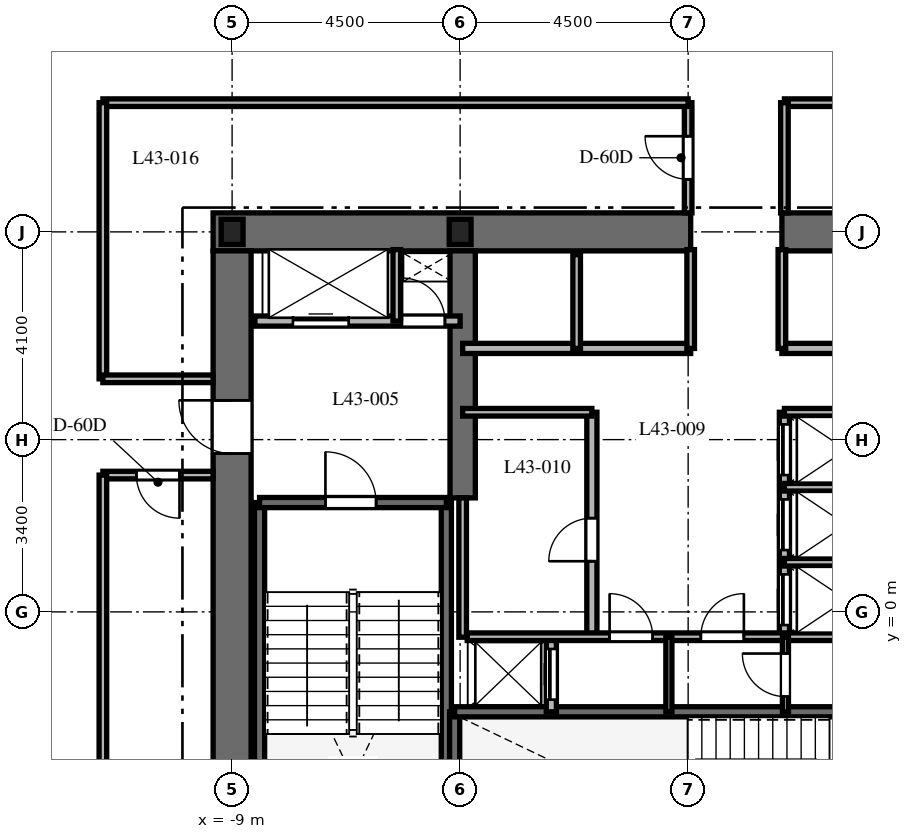
"""IFC4 building model, lengths in metres.
Left out: names, types, materials, properties, quantities, classifications, styles, units other than length and angle.
Written with IfcOpenShell. Run it as: python <this file> out.ifc"""

import sys

from ifc_helpers import new_model, si_unit, direction, frame, frame_2d, origin, origin_2d, place, context, subcontext, project, spatial, rectangle, i_section, extrude, element, fill, save


model = new_model("IFC4")
c1 = context("Model", 3, precision=1e-05, world=origin(), true_north=direction((0.0, 1.0)))
c2 = subcontext(c1, "Body", "Model", "MODEL_VIEW")
j1 = project(units=[si_unit("LENGTHUNIT", "METRE"), si_unit("PLANEANGLEUNIT", "RADIAN")], contexts=[c1])
p1 = place(None, origin())
s1 = spatial("IfcSite", under=j1, at=p1, CompositionType="ELEMENT")
p2 = place(p1, origin())
s2 = spatial("IfcBuilding", under=s1, at=p2, CompositionType="ELEMENT")
p3 = place(p2, frame((0.0, 0.0, 175.6)))
s3 = spatial("IfcBuildingStorey", under=s2, at=p3, CompositionType="ELEMENT", Elevation=175.6)
p4 = place(p3, frame((-9.375, 7.5, 0.0), z_axis=(0.0, 0.0, 1.0), x_axis=(1.0, 0.0, 0.0)))
e1 = element("IfcWall", 1, at=p4, inside=s3, PredefinedType="SHEAR", context=c2, shape_type="SweptSolid", body=[
    extrude(rectangle(XDim=9.425, YDim=0.75, at=frame_2d((4.712, 0.0))), origin(), (0.0, 0.0, 1.0), 3.7),
])
p5 = place(p3, frame((1.85, 7.5, 0.0), z_axis=(0.0, 0.0, 1.0), x_axis=(1.0, 0.0, 0.0)))
e2 = element("IfcWall", 2, at=p5, inside=s3, PredefinedType="SHEAR", context=c2, shape_type="SweptSolid", body=[
    extrude(rectangle(XDim=7.525, YDim=0.75, at=frame_2d((3.762, 0.0))), origin(), (0.0, 0.0, 1.0), 3.7),
])
p6 = place(p3, frame((-9.0, -7.125, 0.0), z_axis=(0.0, 0.0, 1.0), x_axis=(0.0, 1.0, 0.0)))
e3 = element("IfcWall", 3, at=p6, inside=s3, PredefinedType="SHEAR", context=c2, shape_type="SweptSolid", body=[
    extrude(rectangle(XDim=14.25, YDim=0.75, at=frame_2d((7.125, 0.0))), origin(), (0.0, 0.0, 1.0), 3.7),
])
p7 = place(p6, frame((10.25, 0.0, 0.0)))
e4 = element("IfcOpeningElement", 4, at=p7, cuts=e3, PredefinedType="OPENING", context=c2, shape_type="SweptSolid", body=[
    extrude(rectangle(XDim=1.05, YDim=2.15, at=frame_2d((0.525, 1.075))), frame((0.0, 0.385, 0.0), z_axis=(0.0, -1.0, 0.0), x_axis=(1.0, 0.0, 0.0)), (0.0, 0.0, 1.0), 0.77),
])
p8 = place(p3, frame((-4.45, 2.25, 0.0), z_axis=(0.0, 0.0, 1.0), x_axis=(0.0, 1.0, 0.0)))
e5 = element("IfcWall", 5, at=p8, inside=s3, PredefinedType="SHEAR", context=c2, shape_type="SweptSolid", body=[
    extrude(rectangle(XDim=4.875, YDim=0.5, at=frame_2d((2.438, 0.0))), origin(), (0.0, 0.0, 1.0), 3.7),
])
for number, where, z_axis, x_axis in (
    (6, (-8.458, -6.985, 0.0), (0.0, 0.0, 1.0), (0.0, 1.0, 0.0)),
    (7, (-4.772, -6.985, 0.0), (0.0, 0.0, 1.0), (0.0, 1.0, 0.0)),
):
    element("IfcWall", number, at=place(p3, frame(where, z_axis=z_axis, x_axis=x_axis)), inside=s3, PredefinedType="SHEAR", context=c2, shape_type="SweptSolid", body=[
        extrude(rectangle(XDim=9.143, YDim=0.2, at=frame_2d((4.572, 0.0))), origin(), (0.0, 0.0, 1.0), 3.7),
    ])
p9 = place(p3, frame((-8.458, 2.158, 0.0), z_axis=(0.0, 0.0, 1.0), x_axis=(1.0, 0.0, 0.0)))
e8 = element("IfcWall", 8, at=p9, inside=s3, PredefinedType="SHEAR", context=c2, shape_type="SweptSolid", body=[
    extrude(rectangle(XDim=3.686, YDim=0.2, at=frame_2d((1.843, 0.0))), origin(), (0.0, 0.0, 1.0), 3.7),
])
p10 = place(p9, frame((1.3, 0.0, 0.0)))
e9 = element("IfcOpeningElement", 9, at=p10, cuts=e8, PredefinedType="OPENING", context=c2, shape_type="SweptSolid", body=[
    extrude(rectangle(XDim=1.0, YDim=2.15, at=frame_2d((0.5, 1.075))), frame((0.0, 0.11, 0.0), z_axis=(0.0, -1.0, 0.0), x_axis=(1.0, 0.0, 0.0)), (0.0, 0.0, 1.0), 0.22),
])
p11 = place(p3, frame((-4.608, -5.658, 0.0), z_axis=(0.0, 0.0, 1.0), x_axis=(0.0, 1.0, 0.0)))
e10 = element("IfcWall", 10, at=p11, inside=s3, PredefinedType="SHEAR", context=c2, shape_type="SweptSolid", body=[
    extrude(rectangle(XDim=3.686, YDim=0.2, at=frame_2d((1.843, 0.0))), origin(), (0.0, 0.0, 1.0), 3.7),
])
p12 = place(p3, frame((-4.608, -1.972, 0.0), z_axis=(0.0, 0.0, 1.0), x_axis=(1.0, 0.0, 0.0)))
e11 = element("IfcWall", 11, at=p12, inside=s3, PredefinedType="SHEAR", context=c2, shape_type="SweptSolid", body=[
    extrude(rectangle(XDim=9.166, YDim=0.2, at=frame_2d((4.583, 0.0))), origin(), (0.0, 0.0, 1.0), 3.7),
])
for number, where, z_axis, x_axis in (
    (12, (-4.5, 7.5, 0.0), (0.0, 0.0, 1.0), (1.0, 0.0, 0.0)),
    (13, (-9.0, 7.5, 0.0), (0.0, 0.0, 1.0), (1.0, 0.0, 0.0)),
):
    element("IfcColumn", number, at=place(p3, frame(where, z_axis=z_axis, x_axis=x_axis)), inside=s3, PredefinedType="COLUMN", context=c2, shape_type="SweptSolid", body=[
        extrude(i_section(OverallWidth=0.432, OverallDepth=0.498, WebThickness=0.056, FlangeThickness=0.089, at=origin_2d()), origin(), (0.0, 0.0, 1.0), 3.7),
    ])
p13 = place(p3, frame((-8.55, 5.74, 0.0), z_axis=(0.0, 0.0, 1.0), x_axis=(1.0, 0.0, 0.0)))
e14 = element("IfcWall", 14, at=p13, inside=s3, PredefinedType="PARTITIONING", context=c2, shape_type="SweptSolid", body=[
    extrude(rectangle(XDim=4.05, YDim=0.2, at=frame_2d((2.025, 0.0))), origin(), (0.0, 0.0, 1.0), 3.4),
])
p14 = place(p13, frame((0.75, 0.0, 0.0)))
e15 = element("IfcOpeningElement", 15, at=p14, cuts=e14, PredefinedType="OPENING", context=c2, shape_type="SweptSolid", body=[
    extrude(rectangle(XDim=1.1, YDim=2.2, at=frame_2d((0.55, 1.1))), frame((0.0, 0.11, 0.0), z_axis=(0.0, -1.0, 0.0), x_axis=(1.0, 0.0, 0.0)), (0.0, 0.0, 1.0), 0.22),
])
p15 = place(p13, frame((2.9, 0.0, 0.0)))
e16 = element("IfcOpeningElement", 16, at=p15, cuts=e14, PredefinedType="OPENING", context=c2, shape_type="SweptSolid", body=[
    extrude(rectangle(XDim=0.85, YDim=2.03, at=frame_2d((0.425, 1.015))), frame((0.0, 0.11, 0.0), z_axis=(0.0, -1.0, 0.0), x_axis=(1.0, 0.0, 0.0)), (0.0, 0.0, 1.0), 0.22),
])
p16 = place(p3, frame((-5.75, 5.74, 0.0), z_axis=(0.0, 0.0, 1.0), x_axis=(0.0, 1.0, 0.0)))
e17 = element("IfcWall", 17, at=p16, inside=s3, PredefinedType="PARTITIONING", context=c2, shape_type="SweptSolid", body=[
    extrude(rectangle(XDim=1.41, YDim=0.15, at=frame_2d((0.705, 0.0))), origin(), (0.0, 0.0, 1.0), 3.4),
])
p17 = place(p3, frame((-2.7, -1.972, 0.0), z_axis=(0.0, 0.0, 1.0), x_axis=(0.0, 1.0, 0.0)))
e18 = element("IfcWall", 18, at=p17, inside=s3, PredefinedType="PARTITIONING", context=c2, shape_type="SweptSolid", body=[
    extrude(rectangle(XDim=1.472, YDim=0.2, at=frame_2d((0.736, 0.0))), origin(), (0.0, 0.0, 1.0), 3.4),
])
p18 = place(p17, frame((0.24, 0.0, 0.0)))
e19 = element("IfcOpeningElement", 19, at=p18, cuts=e18, PredefinedType="OPENING", context=c2, shape_type="SweptSolid", body=[
    extrude(rectangle(XDim=1.0, YDim=2.2, at=frame_2d((0.5, 1.1))), frame((0.0, 0.11, 0.0), z_axis=(0.0, -1.0, 0.0), x_axis=(1.0, 0.0, 0.0)), (0.0, 0.0, 1.0), 0.22),
])
p19 = place(p3, frame((-4.45, 5.2, 0.0), z_axis=(0.0, 0.0, 1.0), x_axis=(1.0, 0.0, 0.0)))
e20 = element("IfcWall", 20, at=p19, inside=s3, PredefinedType="PARTITIONING", context=c2, shape_type="SweptSolid", body=[
    extrude(rectangle(XDim=4.5, YDim=0.2, at=frame_2d((2.25, 0.0))), origin(), (0.0, 0.0, 1.0), 3.4),
])
p20 = place(p3, frame((1.85, 5.2, 0.0), z_axis=(0.0, 0.0, 1.0), x_axis=(1.0, 0.0, 0.0)))
e21 = element("IfcWall", 21, at=p20, inside=s3, PredefinedType="PARTITIONING", context=c2, shape_type="SweptSolid", body=[
    extrude(rectangle(XDim=2.6, YDim=0.2, at=frame_2d((1.3, 0.0))), origin(), (0.0, 0.0, 1.0), 3.4),
])
p21 = place(p3, frame((-2.2, 5.2, 0.0), z_axis=(0.0, 0.0, 1.0), x_axis=(0.0, 1.0, 0.0)))
e22 = element("IfcWall", 22, at=p21, inside=s3, PredefinedType="PARTITIONING", context=c2, shape_type="SweptSolid", body=[
    extrude(rectangle(XDim=1.85, YDim=0.15, at=frame_2d((0.925, 0.0))), origin(), (0.0, 0.0, 1.0), 3.4),
])
for number, where, z_axis, x_axis in (
    (23, (0.05, 5.2, 0.0), (0.0, 0.0, 1.0), (0.0, 1.0, 0.0)),
    (24, (1.85, 5.2, 0.0), (0.0, 0.0, 1.0), (0.0, 1.0, 0.0)),
):
    element("IfcWall", number, at=place(p3, frame(where, z_axis=z_axis, x_axis=x_axis)), inside=s3, PredefinedType="PARTITIONING", context=c2, shape_type="SweptSolid", body=[
        extrude(rectangle(XDim=1.95, YDim=0.15, at=frame_2d((0.975, 0.0))), origin(), (0.0, 0.0, 1.0), 3.4),
    ])
p22 = place(p3, frame((-4.45, -0.5, 0.0), z_axis=(0.0, 0.0, 1.0), x_axis=(0.0, 1.0, 0.0)))
e25 = element("IfcWall", 25, at=p22, inside=s3, PredefinedType="PARTITIONING", context=c2, shape_type="SweptSolid", body=[
    extrude(rectangle(XDim=2.75, YDim=0.15, at=frame_2d((1.375, 0.0))), origin(), (0.0, 0.0, 1.0), 3.4),
])
p23 = place(p3, frame((-1.9, -0.5, 0.0), z_axis=(0.0, 0.0, 1.0), x_axis=(0.0, 1.0, 0.0)))
e26 = element("IfcWall", 26, at=p23, inside=s3, PredefinedType="PARTITIONING", context=c2, shape_type="SweptSolid", body=[
    extrude(rectangle(XDim=4.44, YDim=0.2, at=frame_2d((2.22, 0.0))), origin(), (0.0, 0.0, 1.0), 3.4),
])
p24 = place(p23, frame((1.5, 0.0, 0.0)))
e27 = element("IfcOpeningElement", 27, at=p24, cuts=e26, PredefinedType="OPENING", context=c2, shape_type="SweptSolid", body=[
    extrude(rectangle(XDim=0.85, YDim=2.03, at=frame_2d((0.425, 1.015))), frame((0.0, 0.11, 0.0), z_axis=(0.0, -1.0, 0.0), x_axis=(1.0, 0.0, 0.0)), (0.0, 0.0, 1.0), 0.22),
])
p25 = place(p3, frame((-4.45, 3.94, 0.0), z_axis=(0.0, 0.0, 1.0), x_axis=(1.0, 0.0, 0.0)))
e28 = element("IfcWall", 28, at=p25, inside=s3, PredefinedType="PARTITIONING", context=c2, shape_type="SweptSolid", body=[
    extrude(rectangle(XDim=2.55, YDim=0.15, at=frame_2d((1.275, 0.0))), origin(), (0.0, 0.0, 1.0), 3.4),
])
p26 = place(p3, frame((1.9, -0.5, 0.0), z_axis=(0.0, 0.0, 1.0), x_axis=(0.0, 1.0, 0.0)))
e29 = element("IfcWall", 29, at=p26, inside=s3, PredefinedType="PARTITIONING", context=c2, shape_type="SweptSolid", body=[
    extrude(rectangle(XDim=4.44, YDim=0.2, at=frame_2d((2.22, 0.0))), origin(), (0.0, 0.0, 1.0), 3.4),
])
p27 = place(p26, frame((0.24, 0.0, 0.0)))
e30 = element("IfcOpeningElement", 30, at=p27, cuts=e29, PredefinedType="OPENING", context=c2, shape_type="SweptSolid", body=[
    extrude(rectangle(XDim=1.0, YDim=2.2, at=frame_2d((0.5, 1.1))), frame((0.0, 0.11, 0.0), z_axis=(0.0, -1.0, 0.0), x_axis=(1.0, 0.0, 0.0)), (0.0, 0.0, 1.0), 0.22),
])
p28 = place(p26, frame((1.72, 0.0, 0.0)))
e31 = element("IfcOpeningElement", 31, at=p28, cuts=e29, PredefinedType="OPENING", context=c2, shape_type="SweptSolid", body=[
    extrude(rectangle(XDim=1.0, YDim=2.2, at=frame_2d((0.5, 1.1))), frame((0.0, 0.11, 0.0), z_axis=(0.0, -1.0, 0.0), x_axis=(1.0, 0.0, 0.0)), (0.0, 0.0, 1.0), 0.22),
])
p29 = place(p26, frame((3.2, 0.0, 0.0)))
e32 = element("IfcOpeningElement", 32, at=p29, cuts=e29, PredefinedType="OPENING", context=c2, shape_type="SweptSolid", body=[
    extrude(rectangle(XDim=1.0, YDim=2.2, at=frame_2d((0.5, 1.1))), frame((0.0, 0.11, 0.0), z_axis=(0.0, -1.0, 0.0), x_axis=(1.0, 0.0, 0.0)), (0.0, 0.0, 1.0), 0.22),
])
for number, where, z_axis, x_axis in (
    (33, (1.9, 3.94, 0.0), (0.0, 0.0, 1.0), (1.0, 0.0, 0.0)),
    (34, (1.9, 0.98, 0.0), (0.0, 0.0, 1.0), (1.0, 0.0, 0.0)),
    (35, (1.9, 2.46, 0.0), (0.0, 0.0, 1.0), (1.0, 0.0, 0.0)),
):
    element("IfcWall", number, at=place(p3, frame(where, z_axis=z_axis, x_axis=x_axis)), inside=s3, PredefinedType="PARTITIONING", context=c2, shape_type="SweptSolid", body=[
        extrude(rectangle(XDim=2.55, YDim=0.15, at=frame_2d((1.275, 0.0))), origin(), (0.0, 0.0, 1.0), 3.4),
    ])
p30 = place(p3, frame((-4.36, -0.49, 0.0), z_axis=(0.0, 0.0, 1.0), x_axis=(1.0, 0.0, 0.0)))
e36 = element("IfcWall", 36, at=p30, inside=s3, PredefinedType="PARTITIONING", context=c2, shape_type="SweptSolid", body=[
    extrude(rectangle(XDim=8.72, YDim=0.15, at=frame_2d((4.36, 0.0))), origin(), (0.0, 0.0, 1.0), 3.4),
])
p31 = place(p30, frame((2.81, 0.0, 0.0)))
e37 = element("IfcOpeningElement", 37, at=p31, cuts=e36, PredefinedType="OPENING", context=c2, shape_type="SweptSolid", body=[
    extrude(rectangle(XDim=0.85, YDim=2.03, at=frame_2d((0.425, 1.015))), frame((0.0, 0.085, 0.0), z_axis=(0.0, -1.0, 0.0), x_axis=(1.0, 0.0, 0.0)), (0.0, 0.0, 1.0), 0.17),
])
p32 = place(p30, frame((4.61, 0.0, 0.0)))
e38 = element("IfcOpeningElement", 38, at=p32, cuts=e36, PredefinedType="OPENING", context=c2, shape_type="SweptSolid", body=[
    extrude(rectangle(XDim=0.85, YDim=2.03, at=frame_2d((0.425, 1.015))), frame((0.0, 0.085, 0.0), z_axis=(0.0, -1.0, 0.0), x_axis=(1.0, 0.0, 0.0)), (0.0, 0.0, 1.0), 0.17),
])
p33 = place(p3, frame((-0.38, -1.972, 0.0), z_axis=(0.0, 0.0, 1.0), x_axis=(0.0, 1.0, 0.0)))
e39 = element("IfcWall", 39, at=p33, inside=s3, PredefinedType="PARTITIONING", context=c2, shape_type="SweptSolid", body=[
    extrude(rectangle(XDim=1.472, YDim=0.12, at=frame_2d((0.736, 0.0))), origin(), (0.0, 0.0, 1.0), 3.4),
])
p34 = place(p3, frame((1.92, -1.972, 0.0), z_axis=(0.0, 0.0, 1.0), x_axis=(0.0, 1.0, 0.0)))
e40 = element("IfcWall", 40, at=p34, inside=s3, PredefinedType="PARTITIONING", context=c2, shape_type="SweptSolid", body=[
    extrude(rectangle(XDim=1.472, YDim=0.12, at=frame_2d((0.736, 0.0))), origin(), (0.0, 0.0, 1.0), 3.4),
])
p35 = place(p34, frame((0.3, 0.0, 0.0)))
e41 = element("IfcOpeningElement", 41, at=p35, cuts=e40, PredefinedType="OPENING", context=c2, shape_type="SweptSolid", body=[
    extrude(rectangle(XDim=0.85, YDim=2.03, at=frame_2d((0.425, 1.015))), frame((0.0, 0.07, 0.0), z_axis=(0.0, -1.0, 0.0), x_axis=(1.0, 0.0, 0.0)), (0.0, 0.0, 1.0), 0.14),
])
p36 = place(p3, frame((11.55, 10.05, 0.0), z_axis=(0.0, 0.0, 1.0), x_axis=(-1.0, 0.0, 0.0)))
e42 = element("IfcWall", 42, at=p36, inside=s3, PredefinedType="PARTITIONING", context=c2, shape_type="SweptSolid", body=[
    extrude(rectangle(XDim=9.65, YDim=0.15, at=frame_2d((4.825, 0.0))), origin(), (0.0, 0.0, 1.0), 2.84),
])
p37 = place(p3, frame((1.9, 10.05, 0.0), z_axis=(0.0, 0.0, 1.0), x_axis=(0.0, -1.0, 0.0)))
e43 = element("IfcWall", 43, at=p37, inside=s3, PredefinedType="PARTITIONING", context=c2, shape_type="SweptSolid", body=[
    extrude(rectangle(XDim=2.175, YDim=0.15, at=frame_2d((1.087, 0.0))), origin(), (0.0, 0.0, 1.0), 3.4),
])
p38 = place(p3, frame((0.0, 7.875, 0.0), z_axis=(0.0, 0.0, 1.0), x_axis=(0.0, 1.0, 0.0)))
e44 = element("IfcWall", 44, at=p38, inside=s3, PredefinedType="PARTITIONING", context=c2, shape_type="SweptSolid", body=[
    extrude(rectangle(XDim=2.175, YDim=0.15, at=frame_2d((1.087, 0.0))), origin(), (0.0, 0.0, 1.0), 3.4),
])
p39 = place(p38, frame((0.663, 0.0, 0.0)))
e45 = element("IfcOpeningElement", 45, at=p39, cuts=e44, PredefinedType="OPENING", context=c2, shape_type="SweptSolid", body=[
    extrude(rectangle(XDim=0.85, YDim=2.03, at=frame_2d((0.425, 1.015))), frame((0.0, 0.085, 0.0), z_axis=(0.0, -1.0, 0.0), x_axis=(1.0, 0.0, 0.0)), (0.0, 0.0, 1.0), 0.17),
])
p40 = place(p3, frame((0.0, 10.05, 0.0), z_axis=(0.0, 0.0, 1.0), x_axis=(-1.0, 0.0, 0.0)))
e46 = element("IfcWall", 46, at=p40, inside=s3, PredefinedType="PARTITIONING", context=c2, shape_type="SweptSolid", body=[
    extrude(rectangle(XDim=11.55, YDim=0.15, at=frame_2d((5.775, 0.0))), origin(), (0.0, 0.0, 1.0), 2.84),
])
p41 = place(p3, frame((-11.55, 10.05, 0.0), z_axis=(0.0, 0.0, 1.0), x_axis=(0.0, -1.0, 0.0)))
e47 = element("IfcWall", 47, at=p41, inside=s3, PredefinedType="PARTITIONING", context=c2, shape_type="SweptSolid", body=[
    extrude(rectangle(XDim=5.45, YDim=0.15, at=frame_2d((2.725, 0.0))), origin(), (0.0, 0.0, 1.0), 2.84),
])
p42 = place(p3, frame((-11.55, 4.6, 0.0), z_axis=(0.0, 0.0, 1.0), x_axis=(1.0, 0.0, 0.0)))
e48 = element("IfcWall", 48, at=p42, inside=s3, PredefinedType="PARTITIONING", context=c2, shape_type="SweptSolid", body=[
    extrude(rectangle(XDim=2.175, YDim=0.15, at=frame_2d((1.087, 0.0))), origin(), (0.0, 0.0, 1.0), 3.4),
])
p43 = place(p3, frame((-9.375, 2.7, 0.0), z_axis=(0.0, 0.0, 1.0), x_axis=(-1.0, 0.0, 0.0)))
e49 = element("IfcWall", 49, at=p43, inside=s3, PredefinedType="PARTITIONING", context=c2, shape_type="SweptSolid", body=[
    extrude(rectangle(XDim=2.175, YDim=0.15, at=frame_2d((1.087, 0.0))), origin(), (0.0, 0.0, 1.0), 3.4),
])
p44 = place(p43, frame((0.663, 0.0, 0.0)))
e50 = element("IfcOpeningElement", 50, at=p44, cuts=e49, PredefinedType="OPENING", context=c2, shape_type="SweptSolid", body=[
    extrude(rectangle(XDim=0.85, YDim=2.03, at=frame_2d((0.425, 1.015))), frame((0.0, 0.085, 0.0), z_axis=(0.0, -1.0, 0.0), x_axis=(1.0, 0.0, 0.0)), (0.0, 0.0, 1.0), 0.17),
])
p45 = place(p3, frame((-11.55, 2.7, 0.0), z_axis=(0.0, 0.0, 1.0), x_axis=(0.0, -1.0, 0.0)))
e51 = element("IfcWall", 51, at=p45, inside=s3, PredefinedType="PARTITIONING", context=c2, shape_type="SweptSolid", body=[
    extrude(rectangle(XDim=12.75, YDim=0.15, at=frame_2d((6.375, 0.0))), origin(), (0.0, 0.0, 1.0), 2.84),
])
p46 = place(p10, origin())
e52 = element("IfcDoor", 52, at=p46, inside=s3, OperationType="SINGLE_SWING_LEFT", PredefinedType="DOOR", context=c2, shape_type="SweptSolid", body=[
    extrude(rectangle(XDim=1.0, YDim=2.15, at=frame_2d((0.5, 1.075))), frame((0.0, 0.025, 0.0), z_axis=(0.0, -1.0, 0.0), x_axis=(1.0, 0.0, 0.0)), (0.0, 0.0, 1.0), 0.05),
])
fill(e9, e52)
p47 = place(p7, origin())
e53 = element("IfcDoor", 53, at=p47, inside=s3, OperationType="SINGLE_SWING_RIGHT", PredefinedType="DOOR", context=c2, shape_type="SweptSolid", body=[
    extrude(rectangle(XDim=1.05, YDim=2.15, at=frame_2d((0.525, 1.075))), frame((0.0, 0.025, 0.0), z_axis=(0.0, -1.0, 0.0), x_axis=(1.0, 0.0, 0.0)), (0.0, 0.0, 1.0), 0.05),
])
fill(e4, e53)
p48 = place(p14, origin())
e54 = element("IfcDoor", 54, at=p48, inside=s3, OperationType="SLIDING_TO_LEFT", PredefinedType="DOOR", context=c2, shape_type="SweptSolid", body=[
    extrude(rectangle(XDim=1.1, YDim=2.2, at=frame_2d((0.55, 1.1))), frame((0.0, 0.025, 0.0), z_axis=(0.0, -1.0, 0.0), x_axis=(1.0, 0.0, 0.0)), (0.0, 0.0, 1.0), 0.05),
])
fill(e15, e54)
p49 = place(p15, origin())
e55 = element("IfcDoor", 55, at=p49, inside=s3, OperationType="SINGLE_SWING_LEFT", PredefinedType="DOOR", context=c2, shape_type="SweptSolid", body=[
    extrude(rectangle(XDim=0.85, YDim=2.03, at=frame_2d((0.425, 1.015))), frame((0.0, 0.025, 0.0), z_axis=(0.0, -1.0, 0.0), x_axis=(1.0, 0.0, 0.0)), (0.0, 0.0, 1.0), 0.05),
])
fill(e16, e55)
p50 = place(p18, origin())
e56 = element("IfcDoor", 56, at=p50, inside=s3, OperationType="SLIDING_TO_LEFT", PredefinedType="DOOR", context=c2, shape_type="SweptSolid", body=[
    extrude(rectangle(XDim=1.0, YDim=2.2, at=frame_2d((0.5, 1.1))), frame((0.0, 0.025, 0.0), z_axis=(0.0, -1.0, 0.0), x_axis=(1.0, 0.0, 0.0)), (0.0, 0.0, 1.0), 0.05),
])
fill(e19, e56)
p51 = place(p24, origin())
e57 = element("IfcDoor", 57, at=p51, inside=s3, OperationType="SINGLE_SWING_LEFT", PredefinedType="DOOR", context=c2, shape_type="SweptSolid", body=[
    extrude(rectangle(XDim=0.85, YDim=2.03, at=frame_2d((0.425, 1.015))), frame((0.0, 0.025, 0.0), z_axis=(0.0, -1.0, 0.0), x_axis=(1.0, 0.0, 0.0)), (0.0, 0.0, 1.0), 0.05),
])
fill(e27, e57)
p52 = place(p27, origin())
e58 = element("IfcDoor", 58, at=p52, inside=s3, OperationType="SLIDING_TO_RIGHT", PredefinedType="DOOR", context=c2, shape_type="SweptSolid", body=[
    extrude(rectangle(XDim=1.0, YDim=2.2, at=frame_2d((0.5, 1.1))), frame((0.0, 0.025, 0.0), z_axis=(0.0, -1.0, 0.0), x_axis=(1.0, 0.0, 0.0)), (0.0, 0.0, 1.0), 0.05),
])
fill(e30, e58)
p53 = place(p28, origin())
e59 = element("IfcDoor", 59, at=p53, inside=s3, OperationType="SLIDING_TO_RIGHT", PredefinedType="DOOR", context=c2, shape_type="SweptSolid", body=[
    extrude(rectangle(XDim=1.0, YDim=2.2, at=frame_2d((0.5, 1.1))), frame((0.0, 0.025, 0.0), z_axis=(0.0, -1.0, 0.0), x_axis=(1.0, 0.0, 0.0)), (0.0, 0.0, 1.0), 0.05),
])
fill(e31, e59)
p54 = place(p29, origin())
e60 = element("IfcDoor", 60, at=p54, inside=s3, OperationType="SLIDING_TO_RIGHT", PredefinedType="DOOR", context=c2, shape_type="SweptSolid", body=[
    extrude(rectangle(XDim=1.0, YDim=2.2, at=frame_2d((0.5, 1.1))), frame((0.0, 0.025, 0.0), z_axis=(0.0, -1.0, 0.0), x_axis=(1.0, 0.0, 0.0)), (0.0, 0.0, 1.0), 0.05),
])
fill(e32, e60)
p55 = place(p31, origin())
e61 = element("IfcDoor", 61, at=p55, inside=s3, OperationType="SINGLE_SWING_LEFT", PredefinedType="DOOR", context=c2, shape_type="SweptSolid", body=[
    extrude(rectangle(XDim=0.85, YDim=2.03, at=frame_2d((0.425, 1.015))), frame((0.0, 0.025, 0.0), z_axis=(0.0, -1.0, 0.0), x_axis=(1.0, 0.0, 0.0)), (0.0, 0.0, 1.0), 0.05),
])
fill(e37, e61)
p56 = place(p32, origin())
e62 = element("IfcDoor", 62, at=p56, inside=s3, OperationType="SINGLE_SWING_RIGHT", PredefinedType="DOOR", context=c2, shape_type="SweptSolid", body=[
    extrude(rectangle(XDim=0.85, YDim=2.03, at=frame_2d((0.425, 1.015))), frame((0.0, 0.025, 0.0), z_axis=(0.0, -1.0, 0.0), x_axis=(1.0, 0.0, 0.0)), (0.0, 0.0, 1.0), 0.05),
])
fill(e38, e62)
p57 = place(p35, origin())
e63 = element("IfcDoor", 63, at=p57, inside=s3, OperationType="SINGLE_SWING_RIGHT", PredefinedType="DOOR", context=c2, shape_type="SweptSolid", body=[
    extrude(rectangle(XDim=0.85, YDim=2.03, at=frame_2d((0.425, 1.015))), frame((0.0, 0.025, 0.0), z_axis=(0.0, -1.0, 0.0), x_axis=(1.0, 0.0, 0.0)), (0.0, 0.0, 1.0), 0.05),
])
fill(e41, e63)
p58 = place(p44, origin())
e64 = element("IfcDoor", 64, at=p58, inside=s3, OperationType="SINGLE_SWING_LEFT", PredefinedType="DOOR", context=c2, shape_type="SweptSolid", body=[
    extrude(rectangle(XDim=0.85, YDim=2.03, at=frame_2d((0.425, 1.015))), frame((0.0, 0.025, 0.0), z_axis=(0.0, -1.0, 0.0), x_axis=(1.0, 0.0, 0.0)), (0.0, 0.0, 1.0), 0.05),
])
fill(e50, e64)
p59 = place(p39, origin())
e65 = element("IfcDoor", 65, at=p59, inside=s3, OperationType="SINGLE_SWING_RIGHT", PredefinedType="DOOR", context=c2, shape_type="SweptSolid", body=[
    extrude(rectangle(XDim=0.85, YDim=2.03, at=frame_2d((0.425, 1.015))), frame((0.0, 0.025, 0.0), z_axis=(0.0, -1.0, 0.0), x_axis=(1.0, 0.0, 0.0)), (0.0, 0.0, 1.0), 0.05),
])
fill(e45, e65)
save(model, sys.argv[1])
